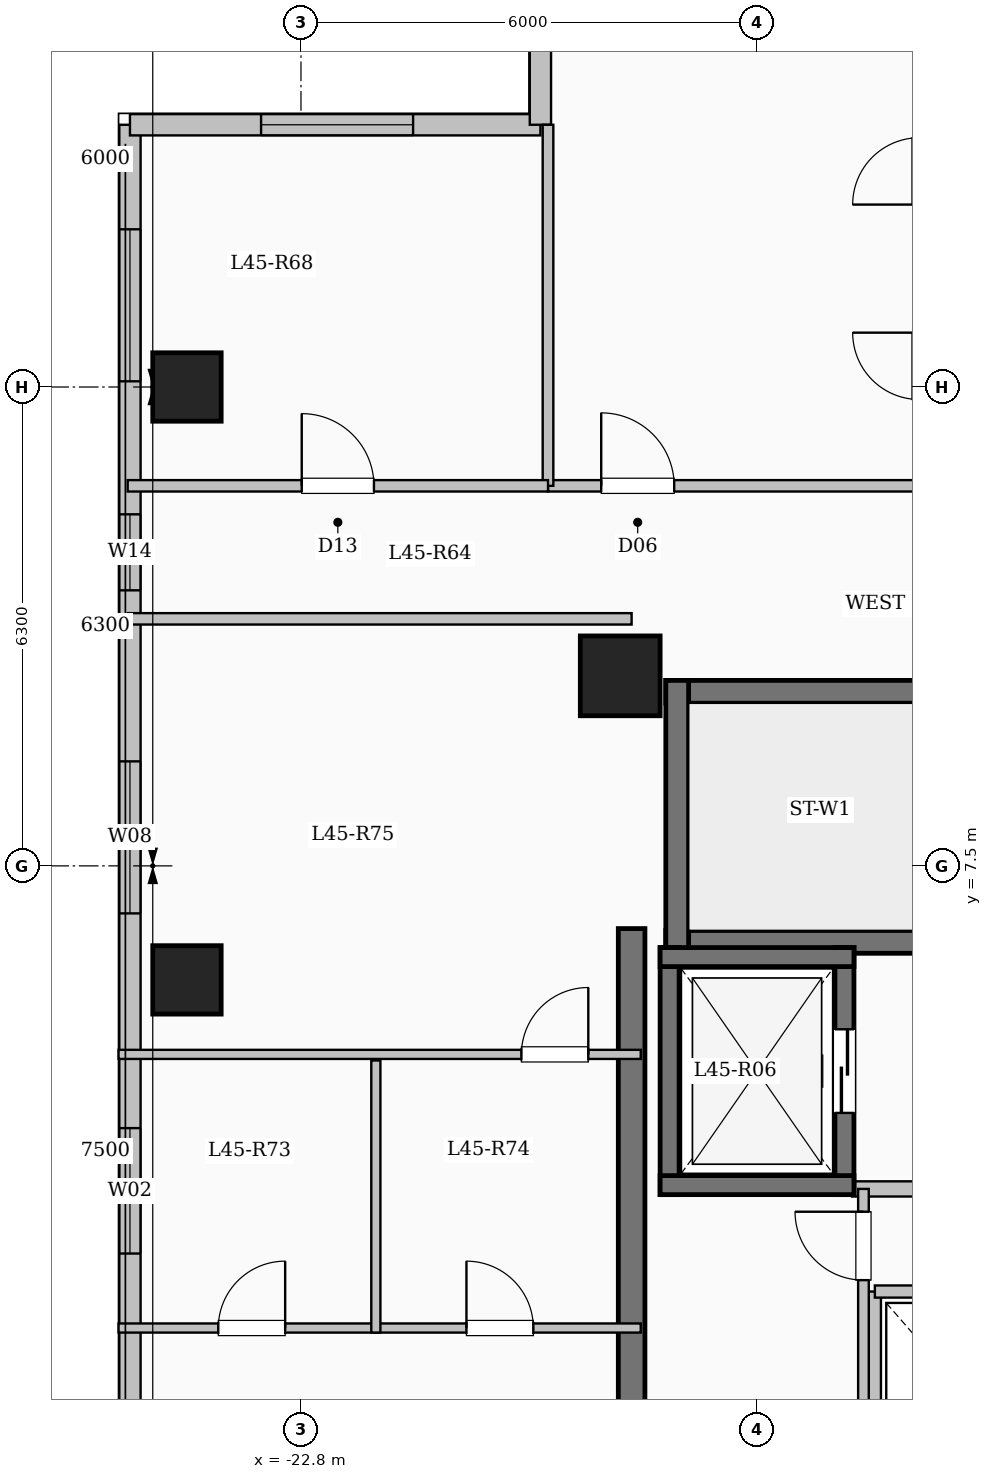
"""IFC4 building model, lengths in metres.
Left out: names, types, materials, properties, quantities, classifications, styles, units other than length and angle.
Written with IfcOpenShell. Run it as: python <this file> out.ifc"""

import sys

from ifc_helpers import new_model, si_unit, direction, frame, frame_2d, origin, origin_2d, place, context, subcontext, project, spatial, rectangle, extrude, element, fill, save


model = new_model("IFC4")
c1 = context("Model", 3, precision=1e-05, world=origin(), true_north=direction((0.0, 1.0)))
c2 = subcontext(c1, "Body", "Model", "MODEL_VIEW")
j1 = project(units=[si_unit("LENGTHUNIT", "METRE"), si_unit("PLANEANGLEUNIT", "RADIAN")], contexts=[c1])
p1 = place(None, origin())
s1 = spatial("IfcSite", under=j1, at=p1, CompositionType="ELEMENT")
p2 = place(p1, origin())
s2 = spatial("IfcBuilding", under=s1, at=p2, CompositionType="ELEMENT")
p3 = place(p2, frame((0.0, 0.0, 166.1)))
s3 = spatial("IfcBuildingStorey", under=s2, at=p3, CompositionType="ELEMENT", Elevation=166.1)
p4 = place(p3, frame((-18.6, 10.0, 0.0), z_axis=(0.0, 0.0, 1.0), x_axis=(1.0, 0.0, 0.0)))
e1 = element("IfcColumn", 1, at=p4, inside=s3, PredefinedType="COLUMN", context=c2, shape_type="SweptSolid", body=[
    extrude(rectangle(XDim=1.05, YDim=1.05, at=origin_2d()), origin(), (0.0, 0.0, 1.0), 3.35),
])
for number, where, z_axis, x_axis in (
    (2, (-24.3, 6.0, 0.0), (0.0, 0.0, 1.0), (1.0, 0.0, 0.0)),
    (3, (-24.3, 13.8, 0.0), (0.0, 0.0, 1.0), (1.0, 0.0, 0.0)),
):
    element("IfcColumn", number, at=place(p3, frame(where, z_axis=z_axis, x_axis=x_axis)), inside=s3, PredefinedType="COLUMN", context=c2, shape_type="SweptSolid", body=[
        extrude(rectangle(XDim=0.9, YDim=0.9, at=origin_2d()), origin(), (0.0, 0.0, 1.0), 3.35),
    ])
p5 = place(p3, frame((-25.05, -17.25, 0.0), z_axis=(0.0, 0.0, 1.0), x_axis=(0.0, 1.0, 0.0)))
e4 = element("IfcWall", 4, at=p5, inside=s3, PredefinedType="SOLIDWALL", context=c2, shape_type="SweptSolid", body=[
    extrude(rectangle(XDim=34.5, YDim=0.28, at=frame_2d((17.25, 0.0))), origin(), (0.0, 0.0, 1.0), 3.1),
])
p6 = place(p5, frame((2.35, 0.0, 0.9)))
e5 = element("IfcOpeningElement", 5, at=p6, cuts=e4, PredefinedType="OPENING", context=c2, shape_type="SweptSolid", body=[
    extrude(rectangle(XDim=2.2, YDim=1.75, at=frame_2d((1.1, 0.875))), frame((0.0, 0.15, 0.0), z_axis=(0.0, -1.0, 0.0), x_axis=(1.0, 0.0, 0.0)), (0.0, 0.0, 1.0), 0.3),
])
p7 = place(p5, frame((7.742, 0.0, 0.9)))
e6 = element("IfcOpeningElement", 6, at=p7, cuts=e4, PredefinedType="OPENING", context=c2, shape_type="SweptSolid", body=[
    extrude(rectangle(XDim=1.5, YDim=1.65, at=frame_2d((0.75, 0.825))), frame((0.0, 0.15, 0.0), z_axis=(0.0, -1.0, 0.0), x_axis=(1.0, 0.0, 0.0)), (0.0, 0.0, 1.0), 0.3),
])
p8 = place(p5, frame((13.25, 0.0, 0.9)))
e7 = element("IfcOpeningElement", 7, at=p8, cuts=e4, PredefinedType="OPENING", context=c2, shape_type="SweptSolid", body=[
    extrude(rectangle(XDim=2.2, YDim=1.75, at=frame_2d((1.1, 0.875))), frame((0.0, 0.15, 0.0), z_axis=(0.0, -1.0, 0.0), x_axis=(1.0, 0.0, 0.0)), (0.0, 0.0, 1.0), 0.3),
])
p9 = place(p5, frame((19.65, 0.0, 0.9)))
e8 = element("IfcOpeningElement", 8, at=p9, cuts=e4, PredefinedType="OPENING", context=c2, shape_type="SweptSolid", body=[
    extrude(rectangle(XDim=1.65, YDim=1.6, at=frame_2d((0.825, 0.8))), frame((0.0, 0.15, 0.0), z_axis=(0.0, -1.0, 0.0), x_axis=(1.0, 0.0, 0.0)), (0.0, 0.0, 1.0), 0.3),
])
p10 = place(p5, frame((24.125, 0.0, 0.9)))
e9 = element("IfcOpeningElement", 9, at=p10, cuts=e4, PredefinedType="OPENING", context=c2, shape_type="SweptSolid", body=[
    extrude(rectangle(XDim=2.0, YDim=1.7, at=frame_2d((1.0, 0.85))), frame((0.0, 0.15, 0.0), z_axis=(0.0, -1.0, 0.0), x_axis=(1.0, 0.0, 0.0)), (0.0, 0.0, 1.0), 0.3),
])
p11 = place(p5, frame((28.375, 0.0, 0.95)))
e10 = element("IfcOpeningElement", 10, at=p11, cuts=e4, PredefinedType="OPENING", context=c2, shape_type="SweptSolid", body=[
    extrude(rectangle(XDim=1.0, YDim=1.5, at=frame_2d((0.5, 0.75))), frame((0.0, 0.15, 0.0), z_axis=(0.0, -1.0, 0.0), x_axis=(1.0, 0.0, 0.0)), (0.0, 0.0, 1.0), 0.3),
])
p12 = place(p5, frame((31.125, 0.0, 0.9)))
e11 = element("IfcOpeningElement", 11, at=p12, cuts=e4, PredefinedType="OPENING", context=c2, shape_type="SweptSolid", body=[
    extrude(rectangle(XDim=2.0, YDim=1.7, at=frame_2d((1.0, 0.85))), frame((0.0, 0.15, 0.0), z_axis=(0.0, -1.0, 0.0), x_axis=(1.0, 0.0, 0.0)), (0.0, 0.0, 1.0), 0.3),
])
p13 = place(p3, frame((-25.05, 17.25, 0.0), z_axis=(0.0, 0.0, 1.0), x_axis=(1.0, 0.0, 0.0)))
e12 = element("IfcWall", 12, at=p13, inside=s3, PredefinedType="SOLIDWALL", context=c2, shape_type="SweptSolid", body=[
    extrude(rectangle(XDim=5.4, YDim=0.28, at=frame_2d((2.7, 0.0))), origin(), (0.0, 0.0, 1.0), 3.1),
])
p14 = place(p13, frame((1.725, 0.0, 0.9)))
e13 = element("IfcOpeningElement", 13, at=p14, cuts=e12, PredefinedType="OPENING", context=c2, shape_type="SweptSolid", body=[
    extrude(rectangle(XDim=2.0, YDim=1.7, at=frame_2d((1.0, 0.85))), frame((0.0, 0.15, 0.0), z_axis=(0.0, -1.0, 0.0), x_axis=(1.0, 0.0, 0.0)), (0.0, 0.0, 1.0), 0.3),
])
p15 = place(p3, frame((-19.65, 17.25, 0.0), z_axis=(0.0, 0.0, 1.0), x_axis=(0.0, 1.0, 0.0)))
e14 = element("IfcWall", 14, at=p15, inside=s3, PredefinedType="SOLIDWALL", context=c2, shape_type="SweptSolid", body=[
    extrude(rectangle(XDim=3.9, YDim=0.28, at=frame_2d((1.95, 0.0))), origin(), (0.0, 0.0, 1.0), 3.1),
])
p16 = place(p15, frame((1.107, 0.0, 0.9)))
e15 = element("IfcOpeningElement", 15, at=p16, cuts=e14, PredefinedType="OPENING", context=c2, shape_type="SweptSolid", body=[
    extrude(rectangle(XDim=1.65, YDim=1.6, at=frame_2d((0.825, 0.8))), frame((0.0, 0.15, 0.0), z_axis=(0.0, -1.0, 0.0), x_axis=(1.0, 0.0, 0.0)), (0.0, 0.0, 1.0), 0.3),
])
p17 = place(p3, frame((-18.0, 9.79, 0.0), z_axis=(0.0, 0.0, 1.0), x_axis=(1.0, 0.0, 0.0)))
e16 = element("IfcWall", 16, at=p17, inside=s3, PredefinedType="SHEAR", context=c2, shape_type="SweptSolid", body=[
    extrude(rectangle(XDim=8.0, YDim=0.3, at=frame_2d((4.0, 0.0))), origin(), (0.0, 0.0, 1.0), 3.35),
])
p18 = place(p3, frame((-18.0, 6.5, 0.0), z_axis=(0.0, 0.0, 1.0), x_axis=(1.0, 0.0, 0.0)))
e17 = element("IfcWall", 17, at=p18, inside=s3, PredefinedType="SHEAR", context=c2, shape_type="SweptSolid", body=[
    extrude(rectangle(XDim=8.0, YDim=0.3, at=frame_2d((4.0, 0.0))), origin(), (0.0, 0.0, 1.0), 3.35),
])
p19 = place(p18, frame((6.45, 0.0, 0.0)))
e18 = element("IfcOpeningElement", 18, at=p19, cuts=e17, PredefinedType="OPENING", context=c2, shape_type="SweptSolid", body=[
    extrude(rectangle(XDim=1.0, YDim=2.15, at=frame_2d((0.5, 1.075))), frame((0.0, 0.16, 0.0), z_axis=(0.0, -1.0, 0.0), x_axis=(1.0, 0.0, 0.0)), (0.0, 0.0, 1.0), 0.32),
])
p20 = place(p3, frame((-17.85, 6.35, 0.0), z_axis=(0.0, 0.0, 1.0), x_axis=(0.0, 1.0, 0.0)))
e19 = element("IfcWall", 19, at=p20, inside=s3, PredefinedType="SHEAR", context=c2, shape_type="SweptSolid", body=[
    extrude(rectangle(XDim=3.59, YDim=0.3, at=frame_2d((1.795, 0.0))), origin(), (0.0, 0.0, 1.0), 3.35),
])
p21 = place(p3, frame((-15.55, 3.25, 0.0), z_axis=(0.0, 0.0, 1.0), x_axis=(1.0, 0.0, 0.0)))
e20 = element("IfcWall", 20, at=p21, inside=s3, PredefinedType="SOLIDWALL", context=c2, shape_type="SweptSolid", body=[
    extrude(rectangle(XDim=5.4, YDim=0.2, at=frame_2d((2.7, 0.0))), origin(), (0.0, 0.0, 1.0), 3.1),
])
p22 = place(p3, frame((-17.95, 3.175, 0.0), z_axis=(0.0, 0.0, 1.0), x_axis=(0.0, 1.0, 0.0)))
e21 = element("IfcWall", 21, at=p22, inside=s3, PredefinedType="SHEAR", context=c2, shape_type="SweptSolid", body=[
    extrude(rectangle(XDim=3.25, YDim=0.25, at=frame_2d((1.625, 0.0))), origin(), (0.0, 0.0, 1.0), 3.35),
])
p23 = place(p3, frame((-15.65, 3.175, 0.0), z_axis=(0.0, 0.0, 1.0), x_axis=(0.0, 1.0, 0.0)))
e22 = element("IfcWall", 22, at=p23, inside=s3, PredefinedType="SHEAR", context=c2, shape_type="SweptSolid", body=[
    extrude(rectangle(XDim=3.25, YDim=0.25, at=frame_2d((1.625, 0.0))), origin(), (0.0, 0.0, 1.0), 3.35),
])
p24 = place(p23, frame((1.075, 0.0, 0.0)))
e23 = element("IfcOpeningElement", 23, at=p24, cuts=e22, PredefinedType="OPENING", context=c2, shape_type="SweptSolid", body=[
    extrude(rectangle(XDim=1.1, YDim=2.15, at=frame_2d((0.55, 1.075))), frame((0.0, 0.135, 0.0), z_axis=(0.0, -1.0, 0.0), x_axis=(1.0, 0.0, 0.0)), (0.0, 0.0, 1.0), 0.27),
])
for number, where, z_axis, x_axis in (
    (24, (-18.075, 3.3, 0.0), (0.0, 0.0, 1.0), (1.0, 0.0, 0.0)),
    (25, (-18.075, 6.3, 0.0), (0.0, 0.0, 1.0), (1.0, 0.0, 0.0)),
):
    element("IfcWall", number, at=place(p3, frame(where, z_axis=z_axis, x_axis=x_axis)), inside=s3, PredefinedType="SHEAR", context=c2, shape_type="SweptSolid", body=[
        extrude(rectangle(XDim=2.55, YDim=0.25, at=frame_2d((1.275, 0.0))), origin(), (0.0, 0.0, 1.0), 3.35),
    ])
p25 = place(p3, frame((-15.25, -0.7, 0.0), z_axis=(0.0, 0.0, 1.0), x_axis=(0.0, 1.0, 0.0)))
e26 = element("IfcWall", 26, at=p25, inside=s3, PredefinedType="SOLIDWALL", context=c2, shape_type="SweptSolid", body=[
    extrude(rectangle(XDim=2.6, YDim=0.16, at=frame_2d((1.3, 0.0))), origin(), (0.0, 0.0, 1.0), 3.1),
])
p26 = place(p3, frame((-15.25, 1.9, 0.0), z_axis=(0.0, 0.0, 1.0), x_axis=(1.0, 0.0, 0.0)))
e27 = element("IfcWall", 27, at=p26, inside=s3, PredefinedType="SOLIDWALL", context=c2, shape_type="SweptSolid", body=[
    extrude(rectangle(XDim=2.3, YDim=0.16, at=frame_2d((1.15, 0.0))), origin(), (0.0, 0.0, 1.0), 3.1),
])
p27 = place(p3, frame((-18.45, -7.375, 0.0), z_axis=(0.0, 0.0, 1.0), x_axis=(0.0, 1.0, 0.0)))
e28 = element("IfcWall", 28, at=p27, inside=s3, PredefinedType="SHEAR", context=c2, shape_type="SweptSolid", body=[
    extrude(rectangle(XDim=14.05, YDim=0.35, at=frame_2d((7.025, 0.0))), origin(), (0.0, 0.0, 1.0), 3.35),
])
p28 = place(p3, frame((-15.4, -7.2, 0.0), z_axis=(0.0, 0.0, 1.0), x_axis=(0.0, 1.0, 0.0)))
e29 = element("IfcWall", 29, at=p28, inside=s3, PredefinedType="PARTITIONING", context=c2, shape_type="SweptSolid", body=[
    extrude(rectangle(XDim=10.45, YDim=0.14, at=frame_2d((5.225, 0.0))), origin(), (0.0, 0.0, 1.0), 3.1),
])
p29 = place(p28, frame((9.25, 0.0, 0.0)))
e30 = element("IfcOpeningElement", 30, at=p29, cuts=e29, PredefinedType="OPENING", context=c2, shape_type="SweptSolid", body=[
    extrude(rectangle(XDim=0.9, YDim=2.08, at=frame_2d((0.45, 1.04))), frame((0.0, 0.08, 0.0), z_axis=(0.0, -1.0, 0.0), x_axis=(1.0, 0.0, 0.0)), (0.0, 0.0, 1.0), 0.16),
])
p30 = place(p3, frame((-19.55, 12.5, 0.0), z_axis=(0.0, 0.0, 1.0), x_axis=(1.0, 0.0, 0.0)))
e31 = element("IfcWall", 31, at=p30, inside=s3, PredefinedType="PARTITIONING", context=c2, shape_type="SweptSolid", body=[
    extrude(rectangle(XDim=15.7, YDim=0.15, at=frame_2d((7.85, 0.0))), origin(), (0.0, 0.0, 1.0), 3.1),
])
p31 = place(p30, frame((0.7, 0.0, 0.0)))
e32 = element("IfcOpeningElement", 32, at=p31, cuts=e31, PredefinedType="OPENING", context=c2, shape_type="SweptSolid", body=[
    extrude(rectangle(XDim=0.96, YDim=2.15, at=frame_2d((0.48, 1.075))), frame((0.0, 0.085, 0.0), z_axis=(0.0, -1.0, 0.0), x_axis=(1.0, 0.0, 0.0)), (0.0, 0.0, 1.0), 0.17),
])
p32 = place(p30, frame((10.348, 0.0, 0.0)))
e33 = element("IfcOpeningElement", 33, at=p32, cuts=e31, PredefinedType="OPENING", context=c2, shape_type="SweptSolid", body=[
    extrude(rectangle(XDim=0.96, YDim=2.15, at=frame_2d((0.48, 1.075))), frame((0.0, 0.085, 0.0), z_axis=(0.0, -1.0, 0.0), x_axis=(1.0, 0.0, 0.0)), (0.0, 0.0, 1.0), 0.17),
])
p33 = place(p3, frame((-25.08, 10.75, 0.0), z_axis=(0.0, 0.0, 1.0), x_axis=(1.0, 0.0, 0.0)))
e34 = element("IfcWall", 34, at=p33, inside=s3, PredefinedType="PARTITIONING", context=c2, shape_type="SweptSolid", body=[
    extrude(rectangle(XDim=6.63, YDim=0.15, at=frame_2d((3.315, 0.0))), origin(), (0.0, 0.0, 1.0), 3.1),
])
p34 = place(p3, frame((-19.55, 12.5, 0.0), z_axis=(0.0, 0.0, 1.0), x_axis=(0.0, 1.0, 0.0)))
e35 = element("IfcWall", 35, at=p34, inside=s3, PredefinedType="PARTITIONING", context=c2, shape_type="SweptSolid", body=[
    extrude(rectangle(XDim=4.75, YDim=0.14, at=frame_2d((2.375, 0.0))), origin(), (0.0, 0.0, 1.0), 3.1),
])
p35 = place(p3, frame((-25.08, 12.5, 0.0), z_axis=(0.0, 0.0, 1.0), x_axis=(1.0, 0.0, 0.0)))
e36 = element("IfcWall", 36, at=p35, inside=s3, PredefinedType="PARTITIONING", context=c2, shape_type="SweptSolid", body=[
    extrude(rectangle(XDim=5.53, YDim=0.15, at=frame_2d((2.765, 0.0))), origin(), (0.0, 0.0, 1.0), 3.1),
])
p36 = place(p35, frame((2.29, 0.0, 0.0)))
e37 = element("IfcOpeningElement", 37, at=p36, cuts=e36, PredefinedType="OPENING", context=c2, shape_type="SweptSolid", body=[
    extrude(rectangle(XDim=0.95, YDim=2.15, at=frame_2d((0.475, 1.075))), frame((0.0, 0.085, 0.0), z_axis=(0.0, -1.0, 0.0), x_axis=(1.0, 0.0, 0.0)), (0.0, 0.0, 1.0), 0.17),
])
p37 = place(p3, frame((-25.2, 1.42, 0.0), z_axis=(0.0, 0.0, 1.0), x_axis=(1.0, 0.0, 0.0)))
e38 = element("IfcWall", 38, at=p37, inside=s3, PredefinedType="PARTITIONING", context=c2, shape_type="SweptSolid", body=[
    extrude(rectangle(XDim=6.87, YDim=0.12, at=frame_2d((3.435, 0.0))), origin(), (0.0, 0.0, 1.0), 3.1),
])
p38 = place(p37, frame((1.312, 0.0, 0.0)))
e39 = element("IfcOpeningElement", 39, at=p38, cuts=e38, PredefinedType="OPENING", context=c2, shape_type="SweptSolid", body=[
    extrude(rectangle(XDim=0.88, YDim=2.1, at=frame_2d((0.44, 1.05))), frame((0.0, 0.07, 0.0), z_axis=(0.0, -1.0, 0.0), x_axis=(1.0, 0.0, 0.0)), (0.0, 0.0, 1.0), 0.14),
])
p39 = place(p37, frame((4.577, 0.0, 0.0)))
e40 = element("IfcOpeningElement", 40, at=p39, cuts=e38, PredefinedType="OPENING", context=c2, shape_type="SweptSolid", body=[
    extrude(rectangle(XDim=0.88, YDim=2.1, at=frame_2d((0.44, 1.05))), frame((0.0, 0.07, 0.0), z_axis=(0.0, -1.0, 0.0), x_axis=(1.0, 0.0, 0.0)), (0.0, 0.0, 1.0), 0.14),
])
p40 = place(p3, frame((-25.2, 5.02, 0.0), z_axis=(0.0, 0.0, 1.0), x_axis=(1.0, 0.0, 0.0)))
e41 = element("IfcWall", 41, at=p40, inside=s3, PredefinedType="PARTITIONING", context=c2, shape_type="SweptSolid", body=[
    extrude(rectangle(XDim=6.87, YDim=0.12, at=frame_2d((3.435, 0.0))), origin(), (0.0, 0.0, 1.0), 3.1),
])
p41 = place(p40, frame((5.3, 0.0, 0.0)))
e42 = element("IfcOpeningElement", 42, at=p41, cuts=e41, PredefinedType="OPENING", context=c2, shape_type="SweptSolid", body=[
    extrude(rectangle(XDim=0.88, YDim=2.1, at=frame_2d((0.44, 1.05))), frame((0.0, 0.07, 0.0), z_axis=(0.0, -1.0, 0.0), x_axis=(1.0, 0.0, 0.0)), (0.0, 0.0, 1.0), 0.14),
])
p42 = place(p3, frame((-21.815, 1.36, 0.0), z_axis=(0.0, 0.0, 1.0), x_axis=(0.0, 1.0, 0.0)))
e43 = element("IfcWall", 43, at=p42, inside=s3, PredefinedType="PARTITIONING", context=c2, shape_type="SweptSolid", body=[
    extrude(rectangle(XDim=3.58, YDim=0.12, at=frame_2d((1.79, 0.0))), origin(), (0.0, 0.0, 1.0), 3.1),
])
p43 = place(p9, origin())
e44 = element("IfcWindow", 44, at=p43, inside=s3, PartitioningType="SINGLE_PANEL", PredefinedType="WINDOW", context=c2, shape_type="SweptSolid", body=[
    extrude(rectangle(XDim=1.65, YDim=1.6, at=frame_2d((0.825, 0.8))), frame((0.0, 0.03, 0.0), z_axis=(0.0, -1.0, 0.0), x_axis=(1.0, 0.0, 0.0)), (0.0, 0.0, 1.0), 0.06),
])
fill(e8, e44)
p44 = place(p10, origin())
e45 = element("IfcWindow", 45, at=p44, inside=s3, PartitioningType="SINGLE_PANEL", PredefinedType="WINDOW", context=c2, shape_type="SweptSolid", body=[
    extrude(rectangle(XDim=2.0, YDim=1.7, at=frame_2d((1.0, 0.85))), frame((0.0, 0.03, 0.0), z_axis=(0.0, -1.0, 0.0), x_axis=(1.0, 0.0, 0.0)), (0.0, 0.0, 1.0), 0.06),
])
fill(e9, e45)
p45 = place(p11, origin())
e46 = element("IfcWindow", 46, at=p45, inside=s3, PartitioningType="SINGLE_PANEL", PredefinedType="WINDOW", context=c2, shape_type="SweptSolid", body=[
    extrude(rectangle(XDim=1.0, YDim=1.5, at=frame_2d((0.5, 0.75))), frame((0.0, 0.03, 0.0), z_axis=(0.0, -1.0, 0.0), x_axis=(1.0, 0.0, 0.0)), (0.0, 0.0, 1.0), 0.06),
])
fill(e10, e46)
p46 = place(p12, origin())
e47 = element("IfcWindow", 47, at=p46, inside=s3, PartitioningType="SINGLE_PANEL", PredefinedType="WINDOW", context=c2, shape_type="SweptSolid", body=[
    extrude(rectangle(XDim=2.0, YDim=1.7, at=frame_2d((1.0, 0.85))), frame((0.0, 0.03, 0.0), z_axis=(0.0, -1.0, 0.0), x_axis=(1.0, 0.0, 0.0)), (0.0, 0.0, 1.0), 0.06),
])
fill(e11, e47)
p47 = place(p14, origin())
e48 = element("IfcWindow", 48, at=p47, inside=s3, PartitioningType="SINGLE_PANEL", PredefinedType="WINDOW", context=c2, shape_type="SweptSolid", body=[
    extrude(rectangle(XDim=2.0, YDim=1.7, at=frame_2d((1.0, 0.85))), frame((0.0, 0.03, 0.0), z_axis=(0.0, -1.0, 0.0), x_axis=(1.0, 0.0, 0.0)), (0.0, 0.0, 1.0), 0.06),
])
fill(e13, e48)
p48 = place(p24, origin())
e49 = element("IfcDoor", 49, at=p48, inside=s3, OperationType="SLIDING_TO_LEFT", PredefinedType="DOOR", context=c2, shape_type="SweptSolid", body=[
    extrude(rectangle(XDim=1.1, YDim=2.15, at=frame_2d((0.55, 1.075))), frame((0.0, 0.025, 0.0), z_axis=(0.0, -1.0, 0.0), x_axis=(1.0, 0.0, 0.0)), (0.0, 0.0, 1.0), 0.05),
])
fill(e23, e49)
p49 = place(p29, origin())
e50 = element("IfcDoor", 50, at=p49, inside=s3, OperationType="SINGLE_SWING_RIGHT", PredefinedType="DOOR", context=c2, shape_type="SweptSolid", body=[
    extrude(rectangle(XDim=0.9, YDim=2.08, at=frame_2d((0.45, 1.04))), frame((0.0, 0.025, 0.0), z_axis=(0.0, -1.0, 0.0), x_axis=(1.0, 0.0, 0.0)), (0.0, 0.0, 1.0), 0.05),
])
fill(e30, e50)
p50 = place(p31, origin())
e51 = element("IfcDoor", 51, at=p50, inside=s3, OperationType="SINGLE_SWING_LEFT", PredefinedType="DOOR", context=c2, shape_type="SweptSolid", body=[
    extrude(rectangle(XDim=0.96, YDim=2.15, at=frame_2d((0.48, 1.075))), frame((0.0, 0.025, 0.0), z_axis=(0.0, -1.0, 0.0), x_axis=(1.0, 0.0, 0.0)), (0.0, 0.0, 1.0), 0.05),
])
fill(e32, e51)
p51 = place(p36, origin())
e52 = element("IfcDoor", 52, at=p51, inside=s3, OperationType="SINGLE_SWING_LEFT", PredefinedType="DOOR", context=c2, shape_type="SweptSolid", body=[
    extrude(rectangle(XDim=0.95, YDim=2.15, at=frame_2d((0.475, 1.075))), frame((0.0, 0.025, 0.0), z_axis=(0.0, -1.0, 0.0), x_axis=(1.0, 0.0, 0.0)), (0.0, 0.0, 1.0), 0.05),
])
fill(e37, e52)
p52 = place(p38, origin())
e53 = element("IfcDoor", 53, at=p52, inside=s3, OperationType="SINGLE_SWING_RIGHT", PredefinedType="DOOR", context=c2, shape_type="SweptSolid", body=[
    extrude(rectangle(XDim=0.88, YDim=2.1, at=frame_2d((0.44, 1.05))), frame((0.0, 0.025, 0.0), z_axis=(0.0, -1.0, 0.0), x_axis=(1.0, 0.0, 0.0)), (0.0, 0.0, 1.0), 0.05),
])
fill(e39, e53)
p53 = place(p39, origin())
e54 = element("IfcDoor", 54, at=p53, inside=s3, OperationType="SINGLE_SWING_LEFT", PredefinedType="DOOR", context=c2, shape_type="SweptSolid", body=[
    extrude(rectangle(XDim=0.88, YDim=2.1, at=frame_2d((0.44, 1.05))), frame((0.0, 0.025, 0.0), z_axis=(0.0, -1.0, 0.0), x_axis=(1.0, 0.0, 0.0)), (0.0, 0.0, 1.0), 0.05),
])
fill(e40, e54)
p54 = place(p41, origin())
e55 = element("IfcDoor", 55, at=p54, inside=s3, OperationType="SINGLE_SWING_RIGHT", PredefinedType="DOOR", context=c2, shape_type="SweptSolid", body=[
    extrude(rectangle(XDim=0.88, YDim=2.1, at=frame_2d((0.44, 1.05))), frame((0.0, 0.025, 0.0), z_axis=(0.0, -1.0, 0.0), x_axis=(1.0, 0.0, 0.0)), (0.0, 0.0, 1.0), 0.05),
])
fill(e42, e55)
save(model, sys.argv[1])
